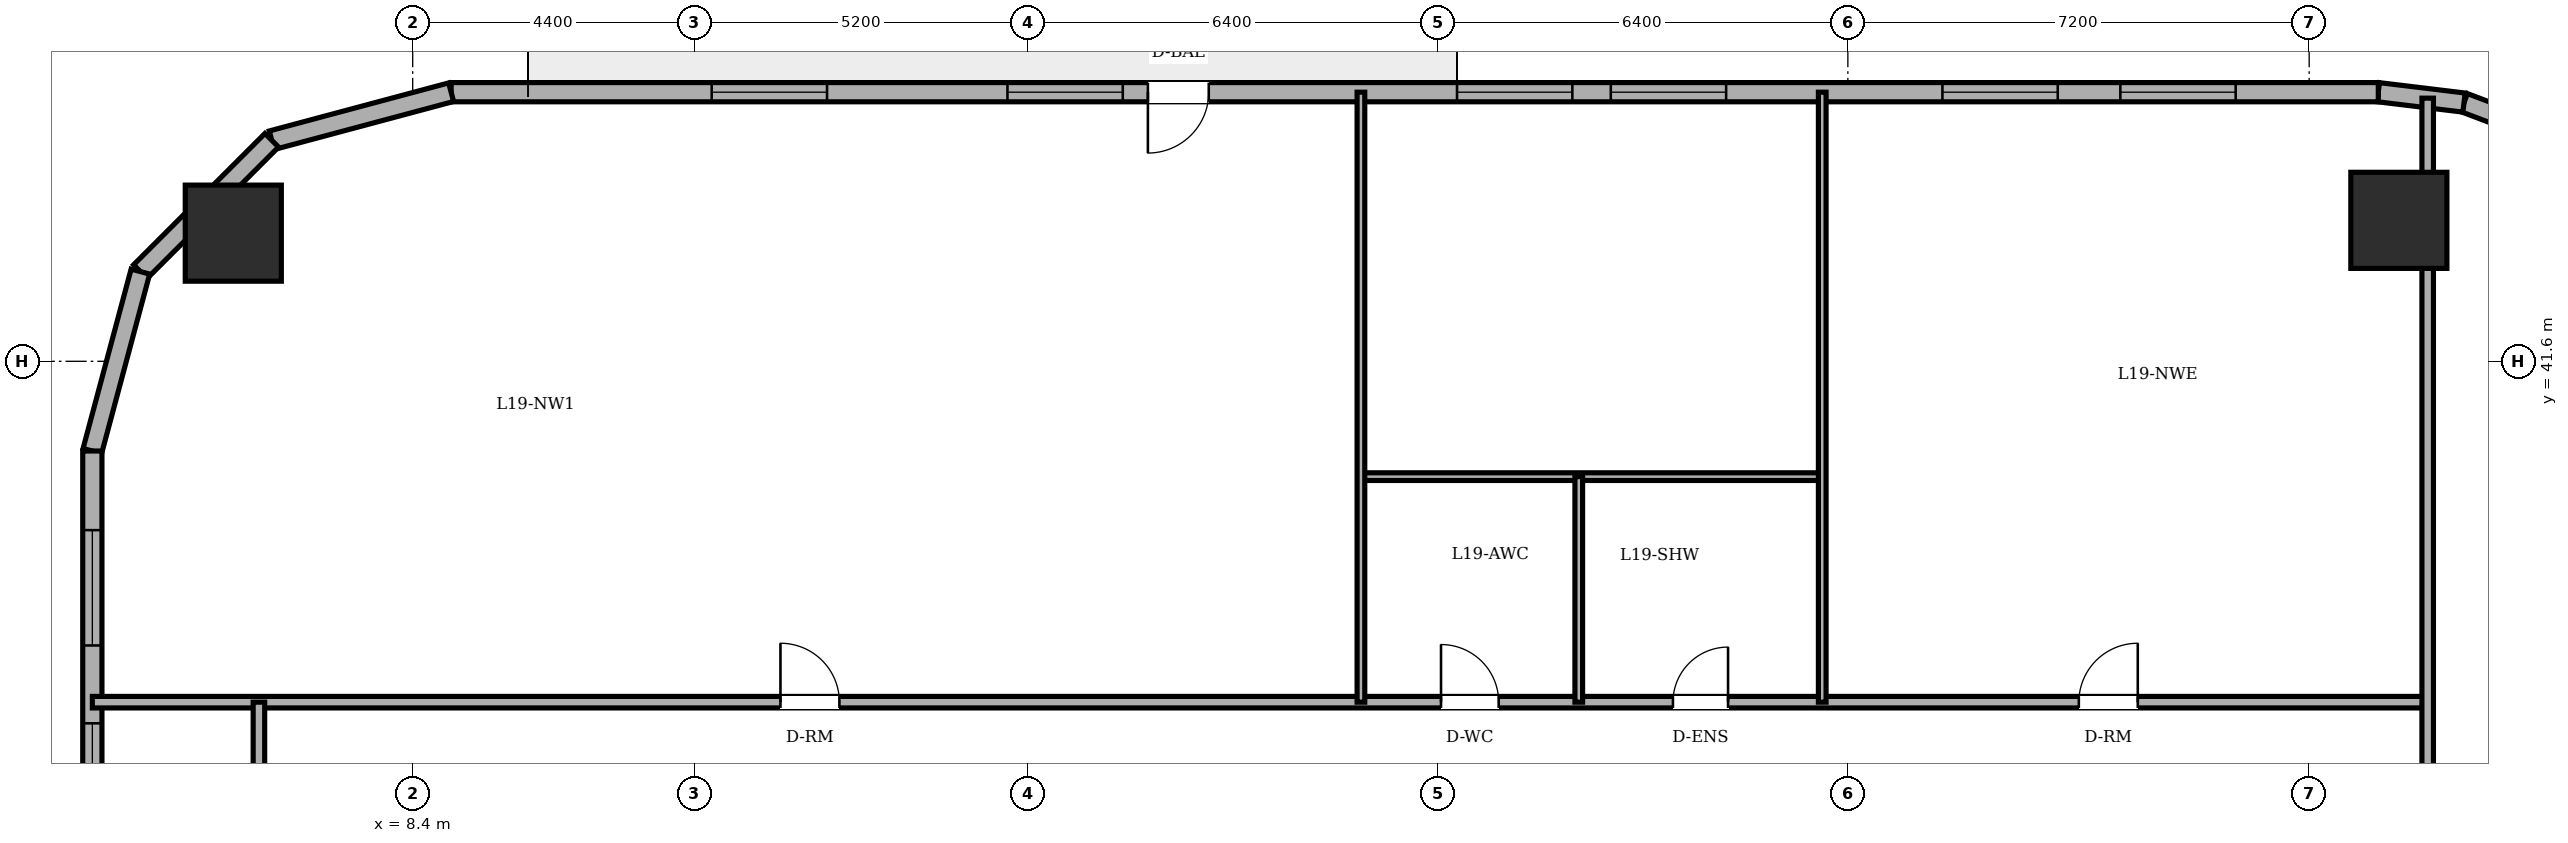
"""IFC4 building model, lengths in metres.
Left out: names, types, materials, properties, quantities, classifications, styles, units other than length and angle.
Written with IfcOpenShell. Run it as: python <this file> out.ifc"""

import sys

from ifc_helpers import new_model, si_unit, direction, frame, frame_2d, origin, origin_2d, place, context, subcontext, project, spatial, rectangle, circle, extrude, element, fill, save


model = new_model("IFC4")
c1 = context("Model", 3, precision=1e-05, world=origin(), true_north=direction((0.0, 1.0)))
c2 = subcontext(c1, "Body", "Model", "MODEL_VIEW")
j1 = project(units=[si_unit("LENGTHUNIT", "METRE"), si_unit("PLANEANGLEUNIT", "RADIAN")], contexts=[c1])
p1 = place(None, origin())
s1 = spatial("IfcSite", under=j1, at=p1, CompositionType="ELEMENT")
p2 = place(p1, origin())
s2 = spatial("IfcBuilding", under=s1, at=p2, CompositionType="ELEMENT")
p3 = place(p2, frame((0.0, 0.0, 72.0)))
s3 = spatial("IfcBuildingStorey", under=s2, at=p3, CompositionType="ELEMENT", Elevation=72.0)
for number, where, z_axis, x_axis in (
    (1, (39.4, 43.8, 0.0), (0.0, 0.0, 1.0), (1.0, 0.0, 0.0)),
    (2, (5.6, 43.6, 0.0), (0.0, 0.0, 1.0), (1.0, 0.0, 0.0)),
):
    element("IfcColumn", number, at=place(p3, frame(where, z_axis=z_axis, x_axis=x_axis)), inside=s3, PredefinedType="COLUMN", context=c2, shape_type="SweptSolid", body=[
        extrude(circle(Radius=0.75, at=origin_2d()), origin(), (0.0, 0.0, 1.0), 3.6),
    ])
p4 = place(p3, frame((41.679, 45.16, 0.0), z_axis=(0.0, 0.0, 1.0), x_axis=(-0.935156721165, 0.354234254216, 0.0)))
e3 = element("IfcWall", 3, at=p4, inside=s3, PredefinedType="SOLIDWALL", context=c2, shape_type="SweptSolid", body=[
    extrude(rectangle(XDim=1.349, YDim=0.3, at=frame_2d((0.675, 0.0))), origin(), (0.0, 0.0, 1.0), 3.36),
])
p5 = place(p3, frame((40.417, 45.638, 0.0), z_axis=(0.0, 0.0, 1.0), x_axis=(-0.992739027259, 0.120288086515, 0.0)))
e4 = element("IfcWall", 4, at=p5, inside=s3, PredefinedType="SOLIDWALL", context=c2, shape_type="SweptSolid", body=[
    extrude(rectangle(XDim=1.348, YDim=0.3, at=frame_2d((0.674, 0.0))), origin(), (0.0, 0.0, 1.0), 3.36),
])
p6 = place(p3, frame((39.079, 45.8, 0.0), z_axis=(0.0, 0.0, 1.0), x_axis=(-1.0, 0.0, 0.0)))
e5 = element("IfcWall", 5, at=p6, inside=s3, PredefinedType="SOLIDWALL", context=c2, shape_type="SweptSolid", body=[
    extrude(rectangle(XDim=30.079, YDim=0.3, at=frame_2d((15.04, 0.0))), origin(), (0.0, 0.0, 1.0), 3.36),
])
p7 = place(p6, frame((18.254, 0.0, 0.0)))
e6 = element("IfcOpeningElement", 6, at=p7, cuts=e5, PredefinedType="OPENING", context=c2, shape_type="SweptSolid", body=[
    extrude(rectangle(XDim=0.95, YDim=2.2, at=frame_2d((0.475, 1.1))), frame((0.0, 0.16, 0.0), z_axis=(0.0, -1.0, 0.0), x_axis=(1.0, 0.0, 0.0)), (0.0, 0.0, 1.0), 0.32),
])
p8 = place(p6, frame((2.226, 0.0, 0.85)))
e7 = element("IfcOpeningElement", 7, at=p8, cuts=e5, PredefinedType="OPENING", context=c2, shape_type="SweptSolid", body=[
    extrude(rectangle(XDim=1.8, YDim=1.55, at=frame_2d((0.9, 0.775))), frame((0.0, 0.16, 0.0), z_axis=(0.0, -1.0, 0.0), x_axis=(1.0, 0.0, 0.0)), (0.0, 0.0, 1.0), 0.32),
])
p9 = place(p6, frame((5.003, 0.0, 0.85)))
e8 = element("IfcOpeningElement", 8, at=p9, cuts=e5, PredefinedType="OPENING", context=c2, shape_type="SweptSolid", body=[
    extrude(rectangle(XDim=1.8, YDim=1.55, at=frame_2d((0.9, 0.775))), frame((0.0, 0.16, 0.0), z_axis=(0.0, -1.0, 0.0), x_axis=(1.0, 0.0, 0.0)), (0.0, 0.0, 1.0), 0.32),
])
p10 = place(p6, frame((10.179, 0.0, 0.85)))
e9 = element("IfcOpeningElement", 9, at=p10, cuts=e5, PredefinedType="OPENING", context=c2, shape_type="SweptSolid", body=[
    extrude(rectangle(XDim=1.8, YDim=1.55, at=frame_2d((0.9, 0.775))), frame((0.0, 0.16, 0.0), z_axis=(0.0, -1.0, 0.0), x_axis=(1.0, 0.0, 0.0)), (0.0, 0.0, 1.0), 0.32),
])
p11 = place(p6, frame((12.579, 0.0, 0.85)))
e10 = element("IfcOpeningElement", 10, at=p11, cuts=e5, PredefinedType="OPENING", context=c2, shape_type="SweptSolid", body=[
    extrude(rectangle(XDim=1.8, YDim=1.55, at=frame_2d((0.9, 0.775))), frame((0.0, 0.16, 0.0), z_axis=(0.0, -1.0, 0.0), x_axis=(1.0, 0.0, 0.0)), (0.0, 0.0, 1.0), 0.32),
])
p12 = place(p6, frame((19.596, 0.0, 0.85)))
e11 = element("IfcOpeningElement", 11, at=p12, cuts=e5, PredefinedType="OPENING", context=c2, shape_type="SweptSolid", body=[
    extrude(rectangle(XDim=1.8, YDim=1.55, at=frame_2d((0.9, 0.775))), frame((0.0, 0.16, 0.0), z_axis=(0.0, -1.0, 0.0), x_axis=(1.0, 0.0, 0.0)), (0.0, 0.0, 1.0), 0.32),
])
p13 = place(p6, frame((24.212, 0.0, 0.85)))
e12 = element("IfcOpeningElement", 12, at=p13, cuts=e5, PredefinedType="OPENING", context=c2, shape_type="SweptSolid", body=[
    extrude(rectangle(XDim=1.8, YDim=1.55, at=frame_2d((0.9, 0.775))), frame((0.0, 0.16, 0.0), z_axis=(0.0, -1.0, 0.0), x_axis=(1.0, 0.0, 0.0)), (0.0, 0.0, 1.0), 0.32),
])
p14 = place(p3, frame((9.0, 45.8, 0.0), z_axis=(0.0, 0.0, 1.0), x_axis=(-0.96594917914, -0.258731875344, 0.0)))
e13 = element("IfcWall", 13, at=p14, inside=s3, PredefinedType="SOLIDWALL", context=c2, shape_type="SweptSolid", body=[
    extrude(rectangle(XDim=2.899, YDim=0.3, at=frame_2d((1.449, 0.0))), origin(), (0.0, 0.0, 1.0), 3.36),
])
p15 = place(p3, frame((6.2, 45.05, 0.0), z_axis=(0.0, 0.0, 1.0), x_axis=(-0.707106781187, -0.707106781187, 0.0)))
e14 = element("IfcWall", 14, at=p15, inside=s3, PredefinedType="SOLIDWALL", context=c2, shape_type="SweptSolid", body=[
    extrude(rectangle(XDim=2.899, YDim=0.3, at=frame_2d((1.45, 0.0))), origin(), (0.0, 0.0, 1.0), 3.36),
])
p16 = place(p3, frame((4.15, 43.0, 0.0), z_axis=(0.0, 0.0, 1.0), x_axis=(-0.258731875344, -0.96594917914, 0.0)))
e15 = element("IfcWall", 15, at=p16, inside=s3, PredefinedType="SOLIDWALL", context=c2, shape_type="SweptSolid", body=[
    extrude(rectangle(XDim=2.899, YDim=0.3, at=frame_2d((1.449, 0.0))), origin(), (0.0, 0.0, 1.0), 3.36),
])
p17 = place(p3, frame((3.4, 40.2, 0.0), z_axis=(0.0, 0.0, 1.0), x_axis=(0.0, -1.0, 0.0)))
e16 = element("IfcWall", 16, at=p17, inside=s3, PredefinedType="SOLIDWALL", context=c2, shape_type="SweptSolid", body=[
    extrude(rectangle(XDim=32.4, YDim=0.3, at=frame_2d((16.2, 0.0))), origin(), (0.0, 0.0, 1.0), 3.36),
])
p18 = place(p17, frame((1.235, 0.0, 0.85)))
e17 = element("IfcOpeningElement", 17, at=p18, cuts=e16, PredefinedType="OPENING", context=c2, shape_type="SweptSolid", body=[
    extrude(rectangle(XDim=1.8, YDim=1.55, at=frame_2d((0.9, 0.775))), frame((0.0, 0.16, 0.0), z_axis=(0.0, -1.0, 0.0), x_axis=(1.0, 0.0, 0.0)), (0.0, 0.0, 1.0), 0.32),
])
p19 = place(p17, frame((4.25, 0.0, 0.85)))
e18 = element("IfcOpeningElement", 18, at=p19, cuts=e16, PredefinedType="OPENING", context=c2, shape_type="SweptSolid", body=[
    extrude(rectangle(XDim=1.8, YDim=1.55, at=frame_2d((0.9, 0.775))), frame((0.0, 0.16, 0.0), z_axis=(0.0, -1.0, 0.0), x_axis=(1.0, 0.0, 0.0)), (0.0, 0.0, 1.0), 0.32),
])
p20 = place(p17, frame((9.253, 0.0, 0.85)))
e19 = element("IfcOpeningElement", 19, at=p20, cuts=e16, PredefinedType="OPENING", context=c2, shape_type="SweptSolid", body=[
    extrude(rectangle(XDim=1.8, YDim=1.55, at=frame_2d((0.9, 0.775))), frame((0.0, 0.16, 0.0), z_axis=(0.0, -1.0, 0.0), x_axis=(1.0, 0.0, 0.0)), (0.0, 0.0, 1.0), 0.32),
])
p21 = place(p17, frame((13.027, 0.0, 0.85)))
e20 = element("IfcOpeningElement", 20, at=p21, cuts=e16, PredefinedType="OPENING", context=c2, shape_type="SweptSolid", body=[
    extrude(rectangle(XDim=1.8, YDim=1.55, at=frame_2d((0.9, 0.775))), frame((0.0, 0.16, 0.0), z_axis=(0.0, -1.0, 0.0), x_axis=(1.0, 0.0, 0.0)), (0.0, 0.0, 1.0), 0.32),
])
p22 = place(p17, frame((19.573, 0.0, 0.85)))
e21 = element("IfcOpeningElement", 21, at=p22, cuts=e16, PredefinedType="OPENING", context=c2, shape_type="SweptSolid", body=[
    extrude(rectangle(XDim=1.8, YDim=1.55, at=frame_2d((0.9, 0.775))), frame((0.0, 0.16, 0.0), z_axis=(0.0, -1.0, 0.0), x_axis=(1.0, 0.0, 0.0)), (0.0, 0.0, 1.0), 0.32),
])
p23 = place(p17, frame((22.347, 0.0, 0.85)))
e22 = element("IfcOpeningElement", 22, at=p23, cuts=e16, PredefinedType="OPENING", context=c2, shape_type="SweptSolid", body=[
    extrude(rectangle(XDim=1.8, YDim=1.55, at=frame_2d((0.9, 0.775))), frame((0.0, 0.16, 0.0), z_axis=(0.0, -1.0, 0.0), x_axis=(1.0, 0.0, 0.0)), (0.0, 0.0, 1.0), 0.32),
])
p24 = place(p17, frame((26.35, 0.0, 0.85)))
e23 = element("IfcOpeningElement", 23, at=p24, cuts=e16, PredefinedType="OPENING", context=c2, shape_type="SweptSolid", body=[
    extrude(rectangle(XDim=1.8, YDim=1.55, at=frame_2d((0.9, 0.775))), frame((0.0, 0.16, 0.0), z_axis=(0.0, -1.0, 0.0), x_axis=(1.0, 0.0, 0.0)), (0.0, 0.0, 1.0), 0.32),
])
p25 = place(p17, frame((29.365, 0.0, 0.85)))
e24 = element("IfcOpeningElement", 24, at=p25, cuts=e16, PredefinedType="OPENING", context=c2, shape_type="SweptSolid", body=[
    extrude(rectangle(XDim=1.8, YDim=1.55, at=frame_2d((0.9, 0.775))), frame((0.0, 0.16, 0.0), z_axis=(0.0, -1.0, 0.0), x_axis=(1.0, 0.0, 0.0)), (0.0, 0.0, 1.0), 0.32),
])
p26 = place(p3, frame((3.4, 36.28, 0.0), z_axis=(0.0, 0.0, 1.0), x_axis=(1.0, 0.0, 0.0)))
e25 = element("IfcWall", 25, at=p26, inside=s3, PredefinedType="PARTITIONING", context=c2, shape_type="SweptSolid", body=[
    extrude(rectangle(XDim=36.45, YDim=0.18, at=frame_2d((18.225, 0.0))), origin(), (0.0, 0.0, 1.0), 3.36),
])
p27 = place(p26, frame((21.05, 0.0, 0.0)))
e26 = element("IfcOpeningElement", 26, at=p27, cuts=e25, PredefinedType="OPENING", context=c2, shape_type="SweptSolid", body=[
    extrude(rectangle(XDim=0.9, YDim=2.1, at=frame_2d((0.45, 1.05))), frame((0.0, 0.1, 0.0), z_axis=(0.0, -1.0, 0.0), x_axis=(1.0, 0.0, 0.0)), (0.0, 0.0, 1.0), 0.2),
])
p28 = place(p26, frame((24.67, 0.0, 0.0)))
e27 = element("IfcOpeningElement", 27, at=p28, cuts=e25, PredefinedType="OPENING", context=c2, shape_type="SweptSolid", body=[
    extrude(rectangle(XDim=0.86, YDim=2.1, at=frame_2d((0.43, 1.05))), frame((0.0, 0.1, 0.0), z_axis=(0.0, -1.0, 0.0), x_axis=(1.0, 0.0, 0.0)), (0.0, 0.0, 1.0), 0.2),
])
p29 = place(p26, frame((10.74, 0.0, 0.0)))
e28 = element("IfcOpeningElement", 28, at=p29, cuts=e25, PredefinedType="OPENING", context=c2, shape_type="SweptSolid", body=[
    extrude(rectangle(XDim=0.92, YDim=2.1, at=frame_2d((0.46, 1.05))), frame((0.0, 0.1, 0.0), z_axis=(0.0, -1.0, 0.0), x_axis=(1.0, 0.0, 0.0)), (0.0, 0.0, 1.0), 0.2),
])
p30 = place(p26, frame((31.005, 0.0, 0.0)))
e29 = element("IfcOpeningElement", 29, at=p30, cuts=e25, PredefinedType="OPENING", context=c2, shape_type="SweptSolid", body=[
    extrude(rectangle(XDim=0.92, YDim=2.1, at=frame_2d((0.46, 1.05))), frame((0.0, 0.1, 0.0), z_axis=(0.0, -1.0, 0.0), x_axis=(1.0, 0.0, 0.0)), (0.0, 0.0, 1.0), 0.2),
])
p31 = place(p3, frame((23.2, 39.8, 0.0), z_axis=(0.0, 0.0, 1.0), x_axis=(1.0, 0.0, 0.0)))
e30 = element("IfcWall", 30, at=p31, inside=s3, PredefinedType="PARTITIONING", context=c2, shape_type="SweptSolid", body=[
    extrude(rectangle(XDim=7.2, YDim=0.12, at=frame_2d((3.6, 0.0))), origin(), (0.0, 0.0, 1.0), 3.36),
])
p32 = place(p3, frame((6.0, 33.82, 0.0), z_axis=(0.0, 0.0, 1.0), x_axis=(0.0, 1.0, 0.0)))
e31 = element("IfcWall", 31, at=p32, inside=s3, PredefinedType="PARTITIONING", context=c2, shape_type="SweptSolid", body=[
    extrude(rectangle(XDim=2.46, YDim=0.18, at=frame_2d((1.23, 0.0))), origin(), (0.0, 0.0, 1.0), 3.36),
])
p33 = place(p3, frame((23.2, 36.28, 0.0), z_axis=(0.0, 0.0, 1.0), x_axis=(0.0, 1.0, 0.0)))
e32 = element("IfcWall", 32, at=p33, inside=s3, PredefinedType="PARTITIONING", context=c2, shape_type="SweptSolid", body=[
    extrude(rectangle(XDim=9.52, YDim=0.12, at=frame_2d((4.76, 0.0))), origin(), (0.0, 0.0, 1.0), 3.36),
])
p34 = place(p3, frame((26.6, 36.28, 0.0), z_axis=(0.0, 0.0, 1.0), x_axis=(0.0, 1.0, 0.0)))
e33 = element("IfcWall", 33, at=p34, inside=s3, PredefinedType="PARTITIONING", context=c2, shape_type="SweptSolid", body=[
    extrude(rectangle(XDim=3.52, YDim=0.12, at=frame_2d((1.76, 0.0))), origin(), (0.0, 0.0, 1.0), 3.36),
])
p35 = place(p3, frame((30.4, 36.28, 0.0), z_axis=(0.0, 0.0, 1.0), x_axis=(0.0, 1.0, 0.0)))
e34 = element("IfcWall", 34, at=p35, inside=s3, PredefinedType="PARTITIONING", context=c2, shape_type="SweptSolid", body=[
    extrude(rectangle(XDim=9.52, YDim=0.12, at=frame_2d((4.76, 0.0))), origin(), (0.0, 0.0, 1.0), 3.36),
])
p36 = place(p3, frame((39.85, 14.18, 0.0), z_axis=(0.0, 0.0, 1.0), x_axis=(0.0, 1.0, 0.0)))
e35 = element("IfcWall", 35, at=p36, inside=s3, PredefinedType="PARTITIONING", context=c2, shape_type="SweptSolid", body=[
    extrude(rectangle(XDim=31.527, YDim=0.18, at=frame_2d((15.764, 0.0))), origin(), (0.0, 0.0, 1.0), 2.742),
])
p37 = place(p36, frame((13.87, 0.0, 0.0)))
e36 = element("IfcOpeningElement", 36, at=p37, cuts=e35, PredefinedType="OPENING", context=c2, shape_type="SweptSolid", body=[
    extrude(rectangle(XDim=0.92, YDim=2.1, at=frame_2d((0.46, 1.05))), frame((0.0, 0.1, 0.0), z_axis=(0.0, -1.0, 0.0), x_axis=(1.0, 0.0, 0.0)), (0.0, 0.0, 1.0), 0.2),
])
p38 = place(p7, origin())
e37 = element("IfcDoor", 37, at=p38, inside=s3, OperationType="SINGLE_SWING_RIGHT", PredefinedType="DOOR", context=c2, shape_type="SweptSolid", body=[
    extrude(rectangle(XDim=0.95, YDim=2.2, at=frame_2d((0.475, 1.1))), frame((0.0, 0.025, 0.0), z_axis=(0.0, -1.0, 0.0), x_axis=(1.0, 0.0, 0.0)), (0.0, 0.0, 1.0), 0.05),
])
fill(e6, e37)
p39 = place(p8, origin())
e38 = element("IfcWindow", 38, at=p39, inside=s3, PartitioningType="DOUBLE_PANEL_VERTICAL", PredefinedType="WINDOW", context=c2, shape_type="SweptSolid", body=[
    extrude(rectangle(XDim=1.8, YDim=1.55, at=frame_2d((0.9, 0.775))), frame((0.0, 0.03, 0.0), z_axis=(0.0, -1.0, 0.0), x_axis=(1.0, 0.0, 0.0)), (0.0, 0.0, 1.0), 0.06),
])
fill(e7, e38)
p40 = place(p9, origin())
e39 = element("IfcWindow", 39, at=p40, inside=s3, PartitioningType="DOUBLE_PANEL_VERTICAL", PredefinedType="WINDOW", context=c2, shape_type="SweptSolid", body=[
    extrude(rectangle(XDim=1.8, YDim=1.55, at=frame_2d((0.9, 0.775))), frame((0.0, 0.03, 0.0), z_axis=(0.0, -1.0, 0.0), x_axis=(1.0, 0.0, 0.0)), (0.0, 0.0, 1.0), 0.06),
])
fill(e8, e39)
p41 = place(p10, origin())
e40 = element("IfcWindow", 40, at=p41, inside=s3, PartitioningType="DOUBLE_PANEL_VERTICAL", PredefinedType="WINDOW", context=c2, shape_type="SweptSolid", body=[
    extrude(rectangle(XDim=1.8, YDim=1.55, at=frame_2d((0.9, 0.775))), frame((0.0, 0.03, 0.0), z_axis=(0.0, -1.0, 0.0), x_axis=(1.0, 0.0, 0.0)), (0.0, 0.0, 1.0), 0.06),
])
fill(e9, e40)
p42 = place(p11, origin())
e41 = element("IfcWindow", 41, at=p42, inside=s3, PartitioningType="DOUBLE_PANEL_VERTICAL", PredefinedType="WINDOW", context=c2, shape_type="SweptSolid", body=[
    extrude(rectangle(XDim=1.8, YDim=1.55, at=frame_2d((0.9, 0.775))), frame((0.0, 0.03, 0.0), z_axis=(0.0, -1.0, 0.0), x_axis=(1.0, 0.0, 0.0)), (0.0, 0.0, 1.0), 0.06),
])
fill(e10, e41)
p43 = place(p12, origin())
e42 = element("IfcWindow", 42, at=p43, inside=s3, PartitioningType="DOUBLE_PANEL_VERTICAL", PredefinedType="WINDOW", context=c2, shape_type="SweptSolid", body=[
    extrude(rectangle(XDim=1.8, YDim=1.55, at=frame_2d((0.9, 0.775))), frame((0.0, 0.03, 0.0), z_axis=(0.0, -1.0, 0.0), x_axis=(1.0, 0.0, 0.0)), (0.0, 0.0, 1.0), 0.06),
])
fill(e11, e42)
p44 = place(p13, origin())
e43 = element("IfcWindow", 43, at=p44, inside=s3, PartitioningType="DOUBLE_PANEL_VERTICAL", PredefinedType="WINDOW", context=c2, shape_type="SweptSolid", body=[
    extrude(rectangle(XDim=1.8, YDim=1.55, at=frame_2d((0.9, 0.775))), frame((0.0, 0.03, 0.0), z_axis=(0.0, -1.0, 0.0), x_axis=(1.0, 0.0, 0.0)), (0.0, 0.0, 1.0), 0.06),
])
fill(e12, e43)
p45 = place(p18, origin())
e44 = element("IfcWindow", 44, at=p45, inside=s3, PartitioningType="DOUBLE_PANEL_VERTICAL", PredefinedType="WINDOW", context=c2, shape_type="SweptSolid", body=[
    extrude(rectangle(XDim=1.8, YDim=1.55, at=frame_2d((0.9, 0.775))), frame((0.0, 0.03, 0.0), z_axis=(0.0, -1.0, 0.0), x_axis=(1.0, 0.0, 0.0)), (0.0, 0.0, 1.0), 0.06),
])
fill(e17, e44)
p46 = place(p19, origin())
e45 = element("IfcWindow", 45, at=p46, inside=s3, PartitioningType="DOUBLE_PANEL_VERTICAL", PredefinedType="WINDOW", context=c2, shape_type="SweptSolid", body=[
    extrude(rectangle(XDim=1.8, YDim=1.55, at=frame_2d((0.9, 0.775))), frame((0.0, 0.03, 0.0), z_axis=(0.0, -1.0, 0.0), x_axis=(1.0, 0.0, 0.0)), (0.0, 0.0, 1.0), 0.06),
])
fill(e18, e45)
p47 = place(p27, origin())
e46 = element("IfcDoor", 46, at=p47, inside=s3, OperationType="SINGLE_SWING_LEFT", PredefinedType="DOOR", context=c2, shape_type="SweptSolid", body=[
    extrude(rectangle(XDim=0.9, YDim=2.1, at=frame_2d((0.45, 1.05))), frame((0.0, 0.025, 0.0), z_axis=(0.0, -1.0, 0.0), x_axis=(1.0, 0.0, 0.0)), (0.0, 0.0, 1.0), 0.05),
])
fill(e26, e46)
p48 = place(p28, origin())
e47 = element("IfcDoor", 47, at=p48, inside=s3, OperationType="SINGLE_SWING_RIGHT", PredefinedType="DOOR", context=c2, shape_type="SweptSolid", body=[
    extrude(rectangle(XDim=0.86, YDim=2.1, at=frame_2d((0.43, 1.05))), frame((0.0, 0.025, 0.0), z_axis=(0.0, -1.0, 0.0), x_axis=(1.0, 0.0, 0.0)), (0.0, 0.0, 1.0), 0.05),
])
fill(e27, e47)
p49 = place(p29, origin())
e48 = element("IfcDoor", 48, at=p49, inside=s3, OperationType="SINGLE_SWING_LEFT", PredefinedType="DOOR", context=c2, shape_type="SweptSolid", body=[
    extrude(rectangle(XDim=0.92, YDim=2.1, at=frame_2d((0.46, 1.05))), frame((0.0, 0.025, 0.0), z_axis=(0.0, -1.0, 0.0), x_axis=(1.0, 0.0, 0.0)), (0.0, 0.0, 1.0), 0.05),
])
fill(e28, e48)
p50 = place(p30, origin())
e49 = element("IfcDoor", 49, at=p50, inside=s3, OperationType="SINGLE_SWING_RIGHT", PredefinedType="DOOR", context=c2, shape_type="SweptSolid", body=[
    extrude(rectangle(XDim=0.92, YDim=2.1, at=frame_2d((0.46, 1.05))), frame((0.0, 0.025, 0.0), z_axis=(0.0, -1.0, 0.0), x_axis=(1.0, 0.0, 0.0)), (0.0, 0.0, 1.0), 0.05),
])
fill(e29, e49)
save(model, sys.argv[1])
